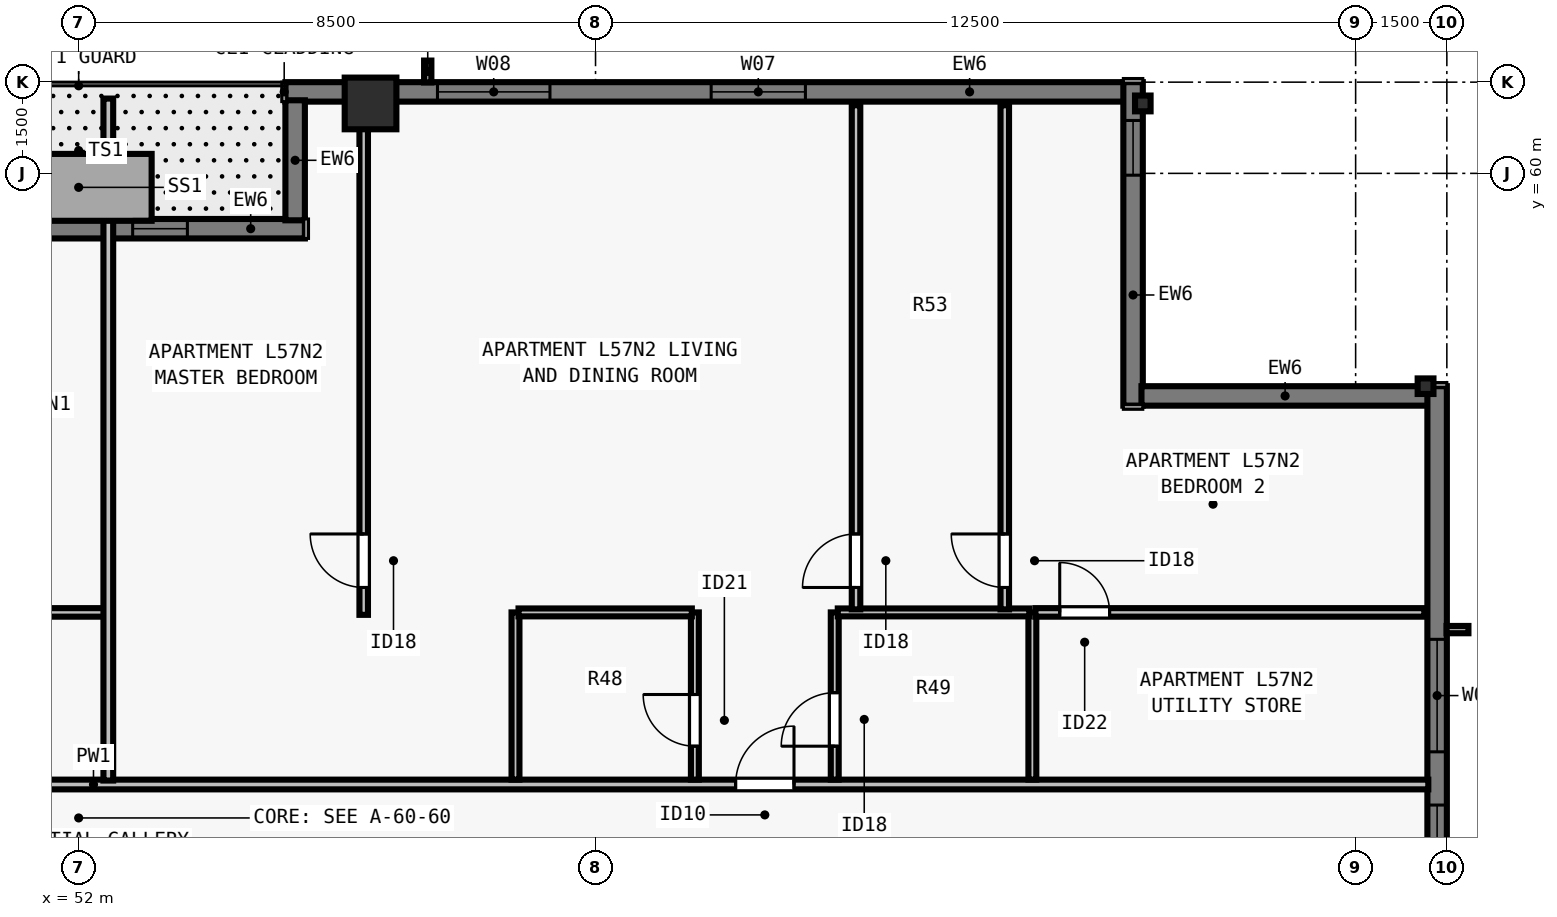
"""IFC4 building model, lengths in metres.
Left out: names, types, materials, properties, quantities, classifications, styles, units other than length and angle.
Written with IfcOpenShell. Run it as: python <this file> out.ifc"""

import sys

from ifc_helpers import new_model, si_unit, direction, frame, frame_2d, origin, origin_2d, place, context, subcontext, project, spatial, rectangle, i_section, extrude, element, fill, save


model = new_model("IFC4")
c1 = context("Model", 3, precision=1e-05, world=origin(), true_north=direction((0.0, 1.0)))
c2 = subcontext(c1, "Body", "Model", "MODEL_VIEW")
j1 = project(units=[si_unit("LENGTHUNIT", "METRE"), si_unit("PLANEANGLEUNIT", "RADIAN")], contexts=[c1])
p1 = place(None, origin())
s1 = spatial("IfcSite", under=j1, at=p1, CompositionType="ELEMENT")
p2 = place(p1, origin())
s2 = spatial("IfcBuilding", under=s1, at=p2, CompositionType="ELEMENT")
p3 = place(p2, frame((0.0, 0.0, 209.5)))
s3 = spatial("IfcBuildingStorey", under=s2, at=p3, CompositionType="ELEMENT", Elevation=209.5)
for number, where, z_axis, x_axis in (
    (1, (74.15, 56.5, 0.0), (0.0, 0.0, 1.0), (0.0, 1.0, 0.0)),
    (2, (69.5, 61.15, 0.0), (0.0, 0.0, 1.0), (1.0, 0.0, 0.0)),
):
    element("IfcColumn", number, at=place(p3, frame(where, z_axis=z_axis, x_axis=x_axis)), inside=s3, PredefinedType="COLUMN", context=c2, shape_type="SweptSolid", body=[
        extrude(i_section(OverallWidth=0.256, OverallDepth=0.26, WebThickness=0.01, FlangeThickness=0.017, FilletRadius=0.013, at=origin_2d()), origin(), (0.0, 0.0, 1.0), 3.5),
    ])
p4 = place(p3, frame((56.8, 61.15, 0.0), z_axis=(0.0, 0.0, 1.0), x_axis=(1.0, 0.0, 0.0)))
e3 = element("IfcColumn", 3, at=p4, inside=s3, PredefinedType="COLUMN", context=c2, shape_type="SweptSolid", body=[
    extrude(rectangle(XDim=0.85, YDim=0.85, at=origin_2d()), origin(), (0.0, 0.0, 1.0), 3.5),
])
p5 = place(p3, frame((55.4, 61.34, 0.0), z_axis=(0.0, 0.0, 1.0), x_axis=(1.0, 0.0, 0.0)))
e4 = element("IfcWall", 4, at=p5, inside=s3, PredefinedType="SOLIDWALL", context=c2, shape_type="SweptSolid", body=[
    extrude(rectangle(XDim=13.802, YDim=0.32, at=frame_2d((6.901, 0.0))), origin(), (0.0, 0.0, 1.0), 3.29),
])
p6 = place(p5, frame((2.5, 0.0, 0.8)))
e5 = element("IfcOpeningElement", 5, at=p6, cuts=e4, PredefinedType="OPENING", context=c2, shape_type="SweptSolid", body=[
    extrude(rectangle(XDim=1.85, YDim=1.678, at=frame_2d((0.925, 0.839))), frame((0.0, 0.17, 0.0), z_axis=(0.0, -1.0, 0.0), x_axis=(1.0, 0.0, 0.0)), (0.0, 0.0, 1.0), 0.34),
])
p7 = place(p5, frame((7.001, 0.0, 0.8)))
e6 = element("IfcOpeningElement", 6, at=p7, cuts=e4, PredefinedType="OPENING", context=c2, shape_type="SweptSolid", body=[
    extrude(rectangle(XDim=1.55, YDim=1.678, at=frame_2d((0.775, 0.839))), frame((0.0, 0.17, 0.0), z_axis=(0.0, -1.0, 0.0), x_axis=(1.0, 0.0, 0.0)), (0.0, 0.0, 1.0), 0.34),
])
p8 = place(p3, frame((69.34, 61.5, 0.0), z_axis=(0.0, 0.0, 1.0), x_axis=(0.0, -1.0, 0.0)))
e7 = element("IfcWall", 7, at=p8, inside=s3, PredefinedType="SOLIDWALL", context=c2, shape_type="SweptSolid", body=[
    extrude(rectangle(XDim=5.32, YDim=0.32, at=frame_2d((2.66, 0.0))), origin(), (0.0, 0.0, 1.0), 3.29),
])
p9 = place(p8, frame((0.63, 0.0, 0.8)))
e8 = element("IfcOpeningElement", 8, at=p9, cuts=e7, PredefinedType="OPENING", context=c2, shape_type="SweptSolid", body=[
    extrude(rectangle(XDim=0.9, YDim=1.678, at=frame_2d((0.45, 0.839))), frame((0.0, 0.17, 0.0), z_axis=(0.0, -1.0, 0.0), x_axis=(1.0, 0.0, 0.0)), (0.0, 0.0, 1.0), 0.34),
])
p10 = place(p3, frame((69.478, 56.34, 0.0), z_axis=(0.0, 0.0, 1.0), x_axis=(1.0, 0.0, 0.0)))
e9 = element("IfcWall", 9, at=p10, inside=s3, PredefinedType="SOLIDWALL", context=c2, shape_type="SweptSolid", body=[
    extrude(rectangle(XDim=4.724, YDim=0.32, at=frame_2d((2.362, 0.0))), origin(), (0.0, 0.0, 1.0), 3.29),
])
p11 = place(p3, frame((74.34, 56.5, 0.0), z_axis=(0.0, 0.0, 1.0), x_axis=(0.0, -1.0, 0.0)))
e10 = element("IfcWall", 10, at=p11, inside=s3, PredefinedType="SOLIDWALL", context=c2, shape_type="SweptSolid", body=[
    extrude(rectangle(XDim=34.702, YDim=0.32, at=frame_2d((17.351, 0.0))), origin(), (0.0, 0.0, 1.0), 3.29),
])
p12 = place(p11, frame((4.163, 0.0, 0.8)))
e11 = element("IfcOpeningElement", 11, at=p12, cuts=e10, PredefinedType="OPENING", context=c2, shape_type="SweptSolid", body=[
    extrude(rectangle(XDim=1.85, YDim=1.678, at=frame_2d((0.925, 0.839))), frame((0.0, 0.17, 0.0), z_axis=(0.0, -1.0, 0.0), x_axis=(1.0, 0.0, 0.0)), (0.0, 0.0, 1.0), 0.34),
])
p13 = place(p11, frame((6.888, 0.0, 0.8)))
e12 = element("IfcOpeningElement", 12, at=p13, cuts=e10, PredefinedType="OPENING", context=c2, shape_type="SweptSolid", body=[
    extrude(rectangle(XDim=1.55, YDim=1.678, at=frame_2d((0.775, 0.839))), frame((0.0, 0.17, 0.0), z_axis=(0.0, -1.0, 0.0), x_axis=(1.0, 0.0, 0.0)), (0.0, 0.0, 1.0), 0.34),
])
p14 = place(p11, frame((10.113, 0.0, 0.8)))
e13 = element("IfcOpeningElement", 13, at=p14, cuts=e10, PredefinedType="OPENING", context=c2, shape_type="SweptSolid", body=[
    extrude(rectangle(XDim=1.85, YDim=1.678, at=frame_2d((0.925, 0.839))), frame((0.0, 0.17, 0.0), z_axis=(0.0, -1.0, 0.0), x_axis=(1.0, 0.0, 0.0)), (0.0, 0.0, 1.0), 0.34),
])
p15 = place(p11, frame((14.888, 0.0, 0.8)))
e14 = element("IfcOpeningElement", 14, at=p15, cuts=e10, PredefinedType="OPENING", context=c2, shape_type="SweptSolid", body=[
    extrude(rectangle(XDim=1.55, YDim=1.678, at=frame_2d((0.775, 0.839))), frame((0.0, 0.17, 0.0), z_axis=(0.0, -1.0, 0.0), x_axis=(1.0, 0.0, 0.0)), (0.0, 0.0, 1.0), 0.34),
])
p16 = place(p11, frame((18.114, 0.0, 0.8)))
e15 = element("IfcOpeningElement", 15, at=p16, cuts=e10, PredefinedType="OPENING", context=c2, shape_type="SweptSolid", body=[
    extrude(rectangle(XDim=1.85, YDim=1.678, at=frame_2d((0.925, 0.839))), frame((0.0, 0.17, 0.0), z_axis=(0.0, -1.0, 0.0), x_axis=(1.0, 0.0, 0.0)), (0.0, 0.0, 1.0), 0.34),
])
p17 = place(p11, frame((23.614, 0.0, 0.8)))
e16 = element("IfcOpeningElement", 16, at=p17, cuts=e10, PredefinedType="OPENING", context=c2, shape_type="SweptSolid", body=[
    extrude(rectangle(XDim=1.85, YDim=1.678, at=frame_2d((0.925, 0.839))), frame((0.0, 0.17, 0.0), z_axis=(0.0, -1.0, 0.0), x_axis=(1.0, 0.0, 0.0)), (0.0, 0.0, 1.0), 0.34),
])
p18 = place(p11, frame((28.839, 0.0, 0.8)))
e17 = element("IfcOpeningElement", 17, at=p18, cuts=e10, PredefinedType="OPENING", context=c2, shape_type="SweptSolid", body=[
    extrude(rectangle(XDim=1.55, YDim=1.678, at=frame_2d((0.775, 0.839))), frame((0.0, 0.17, 0.0), z_axis=(0.0, -1.0, 0.0), x_axis=(1.0, 0.0, 0.0)), (0.0, 0.0, 1.0), 0.34),
])
p19 = place(p3, frame((48.578, 59.09, 0.0), z_axis=(0.0, 0.0, 1.0), x_axis=(1.0, 0.0, 0.0)))
e18 = element("IfcWall", 18, at=p19, inside=s3, PredefinedType="SOLIDWALL", context=c2, shape_type="SweptSolid", body=[
    extrude(rectangle(XDim=7.142, YDim=0.32, at=frame_2d((3.571, 0.0))), origin(), (0.0, 0.0, 1.0), 3.29),
])
p20 = place(p19, frame((1.78, 0.0, 0.0)))
e19 = element("IfcOpeningElement", 19, at=p20, cuts=e18, PredefinedType="OPENING", context=c2, shape_type="SweptSolid", body=[
    extrude(rectangle(XDim=1.0, YDim=2.15, at=frame_2d((0.5, 1.075))), frame((0.0, 0.17, 0.0), z_axis=(0.0, -1.0, 0.0), x_axis=(1.0, 0.0, 0.0)), (0.0, 0.0, 1.0), 0.34),
])
p21 = place(p19, frame((4.31, 0.0, 0.8)))
e20 = element("IfcOpeningElement", 20, at=p21, cuts=e18, PredefinedType="OPENING", context=c2, shape_type="SweptSolid", body=[
    extrude(rectangle(XDim=0.9, YDim=1.678, at=frame_2d((0.45, 0.839))), frame((0.0, 0.17, 0.0), z_axis=(0.0, -1.0, 0.0), x_axis=(1.0, 0.0, 0.0)), (0.0, 0.0, 1.0), 0.34),
])
p22 = place(p3, frame((55.56, 59.228, 0.0), z_axis=(0.0, 0.0, 1.0), x_axis=(0.0, 1.0, 0.0)))
e21 = element("IfcWall", 21, at=p22, inside=s3, PredefinedType="SOLIDWALL", context=c2, shape_type="SweptSolid", body=[
    extrude(rectangle(XDim=1.974, YDim=0.32, at=frame_2d((0.987, 0.0))), origin(), (0.0, 0.0, 1.0), 3.29),
])
p23 = place(p3, frame((29.805, 49.95, 0.0), z_axis=(0.0, 0.0, 1.0), x_axis=(1.0, 0.0, 0.0)))
e22 = element("IfcWall", 22, at=p23, inside=s3, PredefinedType="PARTITIONING", context=c2, shape_type="SweptSolid", body=[
    extrude(rectangle(XDim=44.39, YDim=0.16, at=frame_2d((22.195, 0.0))), origin(), (0.0, 0.0, 1.0), 2.958),
])
p24 = place(p23, frame((10.919, 0.0, 0.0)))
e23 = element("IfcOpeningElement", 23, at=p24, cuts=e22, PredefinedType="OPENING", context=c2, shape_type="SweptSolid", body=[
    extrude(rectangle(XDim=0.96, YDim=2.18, at=frame_2d((0.48, 1.09))), frame((0.0, 0.09, 0.0), z_axis=(0.0, -1.0, 0.0), x_axis=(1.0, 0.0, 0.0)), (0.0, 0.0, 1.0), 0.18),
])
p25 = place(p23, frame((32.999, 0.0, 0.0)))
e24 = element("IfcOpeningElement", 24, at=p25, cuts=e22, PredefinedType="OPENING", context=c2, shape_type="SweptSolid", body=[
    extrude(rectangle(XDim=0.96, YDim=2.18, at=frame_2d((0.48, 1.09))), frame((0.0, 0.09, 0.0), z_axis=(0.0, -1.0, 0.0), x_axis=(1.0, 0.0, 0.0)), (0.0, 0.0, 1.0), 0.18),
])
p26 = place(p3, frame((45.654, 52.78, 0.0), z_axis=(0.0, 0.0, 1.0), x_axis=(1.0, 0.0, 0.0)))
e25 = element("IfcWall", 25, at=p26, inside=s3, PredefinedType="PARTITIONING", context=c2, shape_type="SweptSolid", body=[
    extrude(rectangle(XDim=6.884, YDim=0.14, at=frame_2d((3.442, 0.0))), origin(), (0.0, 0.0, 1.0), 3.29),
])
p27 = place(p26, frame((0.4, 0.0, 0.0)))
e26 = element("IfcOpeningElement", 26, at=p27, cuts=e25, PredefinedType="OPENING", context=c2, shape_type="SweptSolid", body=[
    extrude(rectangle(XDim=0.82, YDim=2.1, at=frame_2d((0.41, 1.05))), frame((0.0, 0.08, 0.0), z_axis=(0.0, -1.0, 0.0), x_axis=(1.0, 0.0, 0.0)), (0.0, 0.0, 1.0), 0.16),
])
p28 = place(p3, frame((52.488, 50.015, 0.0), z_axis=(0.0, 0.0, 1.0), x_axis=(0.0, 1.0, 0.0)))
e27 = element("IfcWall", 27, at=p28, inside=s3, PredefinedType="PARTITIONING", context=c2, shape_type="SweptSolid", body=[
    extrude(rectangle(XDim=11.215, YDim=0.16, at=frame_2d((5.607, 0.0))), origin(), (0.0, 0.0, 1.0), 2.958),
])
p29 = place(p3, frame((59.184, 50.03, 0.0), z_axis=(0.0, 0.0, 1.0), x_axis=(0.0, 1.0, 0.0)))
e28 = element("IfcWall", 28, at=p29, inside=s3, PredefinedType="PLUMBINGWALL", context=c2, shape_type="SweptSolid", body=[
    extrude(rectangle(XDim=2.75, YDim=0.13, at=frame_2d((1.375, 0.0))), origin(), (0.0, 0.0, 1.0), 3.29),
])
p30 = place(p3, frame((62.134, 50.03, 0.0), z_axis=(0.0, 0.0, 1.0), x_axis=(0.0, 1.0, 0.0)))
e29 = element("IfcWall", 29, at=p30, inside=s3, PredefinedType="PLUMBINGWALL", context=c2, shape_type="SweptSolid", body=[
    extrude(rectangle(XDim=2.75, YDim=0.13, at=frame_2d((1.375, 0.0))), origin(), (0.0, 0.0, 1.0), 2.573),
])
p31 = place(p30, frame((0.55, 0.0, 0.0)))
e30 = element("IfcOpeningElement", 30, at=p31, cuts=e29, PredefinedType="OPENING", context=c2, shape_type="SweptSolid", body=[
    extrude(rectangle(XDim=0.85, YDim=2.08, at=frame_2d((0.425, 1.04))), frame((0.0, 0.075, 0.0), z_axis=(0.0, -1.0, 0.0), x_axis=(1.0, 0.0, 0.0)), (0.0, 0.0, 1.0), 0.15),
])
p32 = place(p3, frame((59.234, 52.78, 0.0), z_axis=(0.0, 0.0, 1.0), x_axis=(1.0, 0.0, 0.0)))
e31 = element("IfcWall", 31, at=p32, inside=s3, PredefinedType="PLUMBINGWALL", context=c2, shape_type="SweptSolid", body=[
    extrude(rectangle(XDim=2.85, YDim=0.13, at=frame_2d((1.425, 0.0))), origin(), (0.0, 0.0, 1.0), 3.29),
])
p33 = place(p3, frame((67.684, 50.03, 0.0), z_axis=(0.0, 0.0, 1.0), x_axis=(0.0, 1.0, 0.0)))
e32 = element("IfcWall", 32, at=p33, inside=s3, PredefinedType="PLUMBINGWALL", context=c2, shape_type="SweptSolid", body=[
    extrude(rectangle(XDim=2.75, YDim=0.13, at=frame_2d((1.375, 0.0))), origin(), (0.0, 0.0, 1.0), 3.29),
])
p34 = place(p3, frame((64.434, 50.03, 0.0), z_axis=(0.0, 0.0, 1.0), x_axis=(0.0, 1.0, 0.0)))
e33 = element("IfcWall", 33, at=p34, inside=s3, PredefinedType="PLUMBINGWALL", context=c2, shape_type="SweptSolid", body=[
    extrude(rectangle(XDim=2.75, YDim=0.13, at=frame_2d((1.375, 0.0))), origin(), (0.0, 0.0, 1.0), 3.29),
])
p35 = place(p34, frame((0.55, 0.0, 0.0)))
e34 = element("IfcOpeningElement", 34, at=p35, cuts=e33, PredefinedType="OPENING", context=c2, shape_type="SweptSolid", body=[
    extrude(rectangle(XDim=0.88, YDim=2.1, at=frame_2d((0.44, 1.05))), frame((0.0, 0.075, 0.0), z_axis=(0.0, -1.0, 0.0), x_axis=(1.0, 0.0, 0.0)), (0.0, 0.0, 1.0), 0.15),
])
p36 = place(p3, frame((64.484, 52.78, 0.0), z_axis=(0.0, 0.0, 1.0), x_axis=(1.0, 0.0, 0.0)))
e35 = element("IfcWall", 35, at=p36, inside=s3, PredefinedType="PLUMBINGWALL", context=c2, shape_type="SweptSolid", body=[
    extrude(rectangle(XDim=3.15, YDim=0.13, at=frame_2d((1.575, 0.0))), origin(), (0.0, 0.0, 1.0), 3.29),
])
p37 = place(p3, frame((56.688, 52.74, 0.0), z_axis=(0.0, 0.0, 1.0), x_axis=(0.0, 1.0, 0.0)))
e36 = element("IfcWall", 36, at=p37, inside=s3, PredefinedType="PARTITIONING", context=c2, shape_type="SweptSolid", body=[
    extrude(rectangle(XDim=8.38, YDim=0.14, at=frame_2d((4.19, 0.0))), origin(), (0.0, 0.0, 1.0), 2.573),
])
p38 = place(p37, frame((0.45, 0.0, 0.0)))
e37 = element("IfcOpeningElement", 37, at=p38, cuts=e36, PredefinedType="OPENING", context=c2, shape_type="SweptSolid", body=[
    extrude(rectangle(XDim=0.88, YDim=2.1, at=frame_2d((0.44, 1.05))), frame((0.0, 0.08, 0.0), z_axis=(0.0, -1.0, 0.0), x_axis=(1.0, 0.0, 0.0)), (0.0, 0.0, 1.0), 0.16),
])
p39 = place(p3, frame((67.23, 52.83, 0.0), z_axis=(0.0, 0.0, 1.0), x_axis=(0.0, 1.0, 0.0)))
e38 = element("IfcWall", 38, at=p39, inside=s3, PredefinedType="PARTITIONING", context=c2, shape_type="SweptSolid", body=[
    extrude(rectangle(XDim=8.29, YDim=0.14, at=frame_2d((4.145, 0.0))), origin(), (0.0, 0.0, 1.0), 2.573),
])
p40 = place(p39, frame((0.36, 0.0, 0.0)))
e39 = element("IfcOpeningElement", 39, at=p40, cuts=e38, PredefinedType="OPENING", context=c2, shape_type="SweptSolid", body=[
    extrude(rectangle(XDim=0.88, YDim=2.1, at=frame_2d((0.44, 1.05))), frame((0.0, 0.08, 0.0), z_axis=(0.0, -1.0, 0.0), x_axis=(1.0, 0.0, 0.0)), (0.0, 0.0, 1.0), 0.16),
])
p41 = place(p3, frame((67.734, 52.78, 0.0), z_axis=(0.0, 0.0, 1.0), x_axis=(1.0, 0.0, 0.0)))
e40 = element("IfcWall", 40, at=p41, inside=s3, PredefinedType="PARTITIONING", context=c2, shape_type="SweptSolid", body=[
    extrude(rectangle(XDim=6.396, YDim=0.14, at=frame_2d((3.198, 0.0))), origin(), (0.0, 0.0, 1.0), 2.958),
])
p42 = place(p41, frame((0.4, 0.0, 0.0)))
e41 = element("IfcOpeningElement", 41, at=p42, cuts=e40, PredefinedType="OPENING", context=c2, shape_type="SweptSolid", body=[
    extrude(rectangle(XDim=0.82, YDim=2.1, at=frame_2d((0.41, 1.05))), frame((0.0, 0.08, 0.0), z_axis=(0.0, -1.0, 0.0), x_axis=(1.0, 0.0, 0.0)), (0.0, 0.0, 1.0), 0.16),
])
p43 = place(p3, frame((64.784, 52.83, 0.0), z_axis=(0.0, 0.0, 1.0), x_axis=(0.0, 1.0, 0.0)))
e42 = element("IfcWall", 42, at=p43, inside=s3, PredefinedType="PARTITIONING", context=c2, shape_type="SweptSolid", body=[
    extrude(rectangle(XDim=8.29, YDim=0.14, at=frame_2d((4.145, 0.0))), origin(), (0.0, 0.0, 1.0), 2.573),
])
p44 = place(p43, frame((0.36, 0.0, 0.0)))
e43 = element("IfcOpeningElement", 43, at=p44, cuts=e42, PredefinedType="OPENING", context=c2, shape_type="SweptSolid", body=[
    extrude(rectangle(XDim=0.88, YDim=2.1, at=frame_2d((0.44, 1.05))), frame((0.0, 0.08, 0.0), z_axis=(0.0, -1.0, 0.0), x_axis=(1.0, 0.0, 0.0)), (0.0, 0.0, 1.0), 0.16),
])
p45 = place(p6, origin())
e44 = element("IfcWindow", 44, at=p45, inside=s3, PartitioningType="SINGLE_PANEL", PredefinedType="WINDOW", context=c2, shape_type="SweptSolid", body=[
    extrude(rectangle(XDim=1.85, YDim=1.678, at=frame_2d((0.925, 0.839))), frame((0.0, -0.05, 0.0), z_axis=(0.0, -1.0, 0.0), x_axis=(1.0, 0.0, 0.0)), (0.0, 0.0, 1.0), 0.06),
])
fill(e5, e44)
p46 = place(p7, origin())
e45 = element("IfcWindow", 45, at=p46, inside=s3, PartitioningType="SINGLE_PANEL", PredefinedType="WINDOW", context=c2, shape_type="SweptSolid", body=[
    extrude(rectangle(XDim=1.55, YDim=1.678, at=frame_2d((0.775, 0.839))), frame((0.0, -0.05, 0.0), z_axis=(0.0, -1.0, 0.0), x_axis=(1.0, 0.0, 0.0)), (0.0, 0.0, 1.0), 0.06),
])
fill(e6, e45)
p47 = place(p12, origin())
e46 = element("IfcWindow", 46, at=p47, inside=s3, PartitioningType="SINGLE_PANEL", PredefinedType="WINDOW", context=c2, shape_type="SweptSolid", body=[
    extrude(rectangle(XDim=1.85, YDim=1.678, at=frame_2d((0.925, 0.839))), frame((0.0, -0.05, 0.0), z_axis=(0.0, -1.0, 0.0), x_axis=(1.0, 0.0, 0.0)), (0.0, 0.0, 1.0), 0.06),
])
fill(e11, e46)
p48 = place(p13, origin())
e47 = element("IfcWindow", 47, at=p48, inside=s3, PartitioningType="SINGLE_PANEL", PredefinedType="WINDOW", context=c2, shape_type="SweptSolid", body=[
    extrude(rectangle(XDim=1.55, YDim=1.678, at=frame_2d((0.775, 0.839))), frame((0.0, -0.05, 0.0), z_axis=(0.0, -1.0, 0.0), x_axis=(1.0, 0.0, 0.0)), (0.0, 0.0, 1.0), 0.06),
])
fill(e12, e47)
p49 = place(p21, origin())
e48 = element("IfcWindow", 48, at=p49, inside=s3, PartitioningType="SINGLE_PANEL", PredefinedType="WINDOW", context=c2, shape_type="SweptSolid", body=[
    extrude(rectangle(XDim=0.9, YDim=1.678, at=frame_2d((0.45, 0.839))), frame((0.0, -0.04, 0.0), z_axis=(0.0, -1.0, 0.0), x_axis=(1.0, 0.0, 0.0)), (0.0, 0.0, 1.0), 0.06),
])
fill(e20, e48)
p50 = place(p9, origin())
e49 = element("IfcWindow", 49, at=p50, inside=s3, PartitioningType="SINGLE_PANEL", PredefinedType="WINDOW", context=c2, shape_type="SweptSolid", body=[
    extrude(rectangle(XDim=0.9, YDim=1.678, at=frame_2d((0.45, 0.839))), frame((0.0, -0.04, 0.0), z_axis=(0.0, -1.0, 0.0), x_axis=(1.0, 0.0, 0.0)), (0.0, 0.0, 1.0), 0.06),
])
fill(e8, e49)
p51 = place(p31, origin())
e50 = element("IfcDoor", 50, at=p51, inside=s3, OperationType="SINGLE_SWING_RIGHT", PredefinedType="DOOR", context=c2, shape_type="SweptSolid", body=[
    extrude(rectangle(XDim=0.85, YDim=2.08, at=frame_2d((0.425, 1.04))), frame((0.0, 0.025, 0.0), z_axis=(0.0, -1.0, 0.0), x_axis=(1.0, 0.0, 0.0)), (0.0, 0.0, 1.0), 0.05),
])
fill(e30, e50)
p52 = place(p35, origin())
e51 = element("IfcDoor", 51, at=p52, inside=s3, OperationType="SINGLE_SWING_LEFT", PredefinedType="DOOR", context=c2, shape_type="SweptSolid", body=[
    extrude(rectangle(XDim=0.88, YDim=2.1, at=frame_2d((0.44, 1.05))), frame((0.0, 0.025, 0.0), z_axis=(0.0, -1.0, 0.0), x_axis=(1.0, 0.0, 0.0)), (0.0, 0.0, 1.0), 0.05),
])
fill(e34, e51)
p53 = place(p38, origin())
e52 = element("IfcDoor", 52, at=p53, inside=s3, OperationType="SINGLE_SWING_RIGHT", PredefinedType="DOOR", context=c2, shape_type="SweptSolid", body=[
    extrude(rectangle(XDim=0.88, YDim=2.1, at=frame_2d((0.44, 1.05))), frame((0.0, 0.025, 0.0), z_axis=(0.0, -1.0, 0.0), x_axis=(1.0, 0.0, 0.0)), (0.0, 0.0, 1.0), 0.05),
])
fill(e37, e52)
p54 = place(p42, origin())
e53 = element("IfcDoor", 53, at=p54, inside=s3, OperationType="SINGLE_SWING_LEFT", PredefinedType="DOOR", context=c2, shape_type="SweptSolid", body=[
    extrude(rectangle(XDim=0.82, YDim=2.1, at=frame_2d((0.41, 1.05))), frame((0.0, 0.025, 0.0), z_axis=(0.0, -1.0, 0.0), x_axis=(1.0, 0.0, 0.0)), (0.0, 0.0, 1.0), 0.05),
])
fill(e41, e53)
p55 = place(p40, origin())
e54 = element("IfcDoor", 54, at=p55, inside=s3, OperationType="SINGLE_SWING_RIGHT", PredefinedType="DOOR", context=c2, shape_type="SweptSolid", body=[
    extrude(rectangle(XDim=0.88, YDim=2.1, at=frame_2d((0.44, 1.05))), frame((0.0, 0.025, 0.0), z_axis=(0.0, -1.0, 0.0), x_axis=(1.0, 0.0, 0.0)), (0.0, 0.0, 1.0), 0.05),
])
fill(e39, e54)
p56 = place(p44, origin())
e55 = element("IfcDoor", 55, at=p56, inside=s3, OperationType="SINGLE_SWING_LEFT", PredefinedType="DOOR", context=c2, shape_type="SweptSolid", body=[
    extrude(rectangle(XDim=0.88, YDim=2.1, at=frame_2d((0.44, 1.05))), frame((0.0, 0.025, 0.0), z_axis=(0.0, -1.0, 0.0), x_axis=(1.0, 0.0, 0.0)), (0.0, 0.0, 1.0), 0.05),
])
fill(e43, e55)
p57 = place(p25, origin())
e56 = element("IfcDoor", 56, at=p57, inside=s3, OperationType="SINGLE_SWING_RIGHT", PredefinedType="DOOR", context=c2, shape_type="SweptSolid", body=[
    extrude(rectangle(XDim=0.96, YDim=2.18, at=frame_2d((0.48, 1.09))), frame((0.0, 0.025, 0.0), z_axis=(0.0, -1.0, 0.0), x_axis=(1.0, 0.0, 0.0)), (0.0, 0.0, 1.0), 0.05),
])
fill(e24, e56)
save(model, sys.argv[1])
